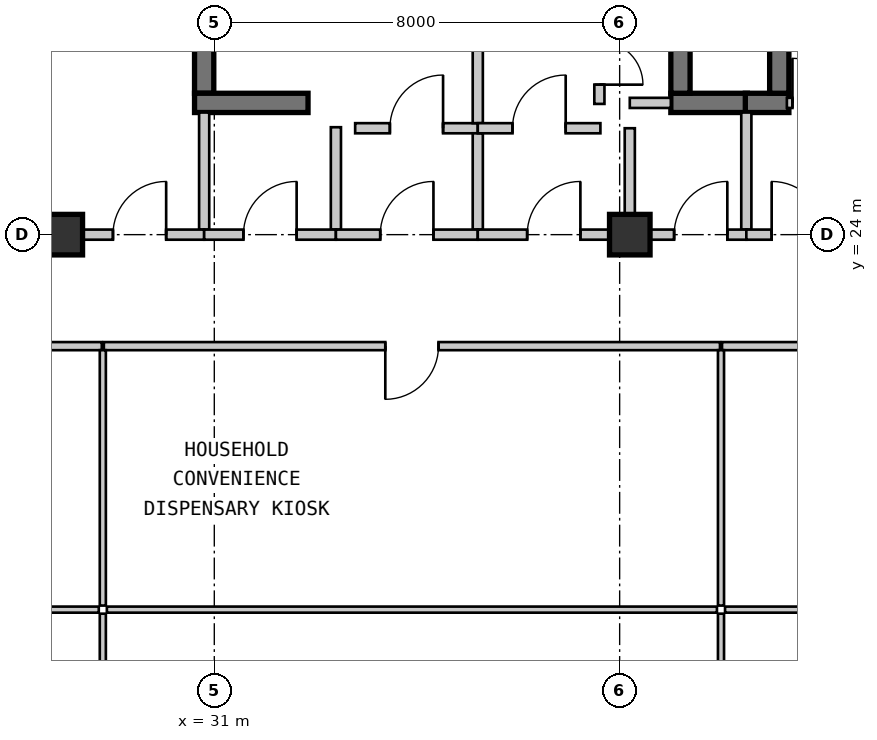
"""IFC4 building model, lengths in metres.
Left out: names, types, materials, properties, quantities, classifications, styles, units other than length and angle.
Written with IfcOpenShell. Run it as: python <this file> out.ifc"""

import sys

from ifc_helpers import new_model, si_unit, direction, frame, frame_2d, origin, origin_2d, place, context, subcontext, project, spatial, rectangle, extrude, source, transform, mapped, element, fill, save


model = new_model("IFC4")
c1 = context("Model", 3, precision=1e-05, world=origin(), true_north=direction((0.0, 1.0)))
c2 = subcontext(c1, "Body", "Model", "MODEL_VIEW")
j1 = project(units=[si_unit("LENGTHUNIT", "METRE"), si_unit("PLANEANGLEUNIT", "RADIAN")], contexts=[c1])
p1 = place(None, origin())
s1 = spatial("IfcSite", under=j1, at=p1, CompositionType="ELEMENT")
p2 = place(p1, origin())
s2 = spatial("IfcBuilding", under=s1, at=p2, CompositionType="ELEMENT")
p3 = place(p2, frame((0.0, 0.0, 45.15)))
s3 = spatial("IfcBuildingStorey", under=s2, at=p3, CompositionType="ELEMENT", Elevation=45.15)
m1 = source(origin(), c2, "Body", "SweptSolid", [
    extrude(rectangle(XDim=0.8, YDim=0.8, at=origin_2d()), origin(), (0.0, 0.0, 1.0), 3.15),
])
for number, where, z_axis, x_axis in (
    (1, (28.0, 24.0, 0.0), (0.0, 0.0, 1.0), (1.0, 0.0, 0.0)),
    (2, (39.2, 24.0, 0.0), (0.0, 0.0, 1.0), (1.0, 0.0, 0.0)),
):
    element("IfcColumn", number, at=place(p3, frame(where, z_axis=z_axis, x_axis=x_axis)), inside=s3, PredefinedType="COLUMN", context=c2, shape_type="MappedRepresentation", body=[
        mapped(m1, transform((0.0, 0.0, 0.0), scale=1.0)),
    ])
m2 = source(origin(), c2, "Body", "SweptSolid", [
    extrude(rectangle(XDim=1.22, YDim=0.38, at=frame_2d((0.61, 0.0))), origin(), (0.0, 0.0, 1.0), 2.93),
])
p4 = place(p3, frame((30.8, 28.01, 0.0), z_axis=(0.0, 0.0, 1.0), x_axis=(0.0, -1.0, 0.0)))
e3 = element("IfcWall", 3, at=p4, inside=s3, PredefinedType="SHEAR", context=c2, shape_type="MappedRepresentation", body=[
    mapped(m2, transform((0.0, 0.0, 0.0), scale=1.0)),
])
m3 = source(origin(), c2, "Body", "SweptSolid", [
    extrude(rectangle(XDim=2.24, YDim=0.38, at=frame_2d((1.12, 0.0))), origin(), (0.0, 0.0, 1.0), 2.93),
])
p5 = place(p3, frame((30.61, 26.6, 0.0), z_axis=(0.0, 0.0, 1.0), x_axis=(1.0, 0.0, 0.0)))
e4 = element("IfcWall", 4, at=p5, inside=s3, PredefinedType="SHEAR", context=c2, shape_type="MappedRepresentation", body=[
    mapped(m3, transform((0.0, 0.0, 0.0), scale=1.0)),
])
m4 = source(origin(), c2, "Body", "SweptSolid", [
    extrude(rectangle(XDim=1.51, YDim=0.38, at=frame_2d((0.755, 0.0))), origin(), (0.0, 0.0, 1.0), 2.93),
])
p6 = place(p3, frame((40.01, 26.6, 0.0), z_axis=(0.0, 0.0, 1.0), x_axis=(1.0, 0.0, 0.0)))
e5 = element("IfcWall", 5, at=p6, inside=s3, PredefinedType="SHEAR", context=c2, shape_type="MappedRepresentation", body=[
    mapped(m4, transform((0.0, 0.0, 0.0), scale=1.0)),
])
p7 = place(p3, frame((40.2, 28.01, 0.0), z_axis=(0.0, 0.0, 1.0), x_axis=(0.0, -1.0, 0.0)))
e6 = element("IfcWall", 6, at=p7, inside=s3, PredefinedType="SHEAR", context=c2, shape_type="MappedRepresentation", body=[
    mapped(m2, transform((0.0, 0.0, 0.0), scale=1.0)),
])
m5 = source(origin(), c2, "Body", "SweptSolid", [
    extrude(rectangle(XDim=0.86, YDim=0.38, at=frame_2d((0.43, 0.0))), origin(), (0.0, 0.0, 1.0), 2.93),
])
p8 = place(p3, frame((41.48, 26.6, 0.0), z_axis=(0.0, 0.0, 1.0), x_axis=(1.0, 0.0, 0.0)))
e7 = element("IfcWall", 7, at=p8, inside=s3, PredefinedType="SHEAR", context=c2, shape_type="MappedRepresentation", body=[
    mapped(m5, transform((0.0, 0.0, 0.0), scale=1.0)),
])
p9 = place(p3, frame((42.15, 26.79, 0.0), z_axis=(0.0, 0.0, 1.0), x_axis=(0.0, 1.0, 0.0)))
e8 = element("IfcWall", 8, at=p9, inside=s3, PredefinedType="SHEAR", context=c2, shape_type="MappedRepresentation", body=[
    mapped(m2, transform((0.0, 0.0, 0.0), scale=1.0)),
])
m6 = source(origin(), c2, "Body", "SweptSolid", [
    extrude(rectangle(XDim=2.31, YDim=0.2, at=frame_2d((1.155, 0.0))), origin(), (0.0, 0.0, 1.0), 2.93),
])
p10 = place(p3, frame((30.8, 26.41, 0.0), z_axis=(0.0, 0.0, 1.0), x_axis=(0.0, -1.0, 0.0)))
e9 = element("IfcWall", 9, at=p10, inside=s3, PredefinedType="SOLIDWALL", context=c2, shape_type="MappedRepresentation", body=[
    mapped(m6, transform((0.0, 0.0, 0.0), scale=1.0)),
])
m7 = source(origin(), c2, "Body", "SweptSolid", [
    extrude(rectangle(XDim=4.35, YDim=0.2, at=frame_2d((2.175, 0.0))), origin(), (0.0, 0.0, 1.0), 2.47),
])
p11 = place(p3, frame((30.8, 24.0, 0.0), z_axis=(0.0, 0.0, 1.0), x_axis=(-1.0, 0.0, 0.0)))
e10 = element("IfcWall", 10, at=p11, inside=s3, PredefinedType="SOLIDWALL", context=c2, shape_type="MappedRepresentation", body=[
    mapped(m7, transform((0.0, 0.0, 0.0), scale=1.0)),
])
m8 = source(origin(), c2, "Body", "SweptSolid", [
    extrude(rectangle(XDim=1.05, YDim=2.1, at=frame_2d((0.525, 1.05))), frame((0.0, 0.11, 0.0), z_axis=(0.0, -1.0, 0.0), x_axis=(1.0, 0.0, 0.0)), (0.0, 0.0, 1.0), 0.22),
])
p12 = place(p11, frame((0.75, 0.0, 0.0)))
e11 = element("IfcOpeningElement", 11, at=p12, cuts=e10, PredefinedType="OPENING", context=c2, shape_type="MappedRepresentation", body=[
    mapped(m8, transform((0.0, 0.0, 0.0), scale=1.0)),
])
m9 = source(origin(), c2, "Body", "SweptSolid", [
    extrude(rectangle(XDim=2.02, YDim=0.2, at=frame_2d((1.01, 0.0))), origin(), (0.0, 0.0, 1.0), 2.93),
])
p13 = place(p3, frame((33.4, 26.12, 0.0), z_axis=(0.0, 0.0, 1.0), x_axis=(0.0, -1.0, 0.0)))
e12 = element("IfcWall", 12, at=p13, inside=s3, PredefinedType="SOLIDWALL", context=c2, shape_type="MappedRepresentation", body=[
    mapped(m9, transform((0.0, 0.0, 0.0), scale=1.0)),
])
m10 = source(origin(), c2, "Body", "SweptSolid", [
    extrude(rectangle(XDim=2.6, YDim=0.2, at=frame_2d((1.3, 0.0))), origin(), (0.0, 0.0, 1.0), 2.47),
])
p14 = place(p3, frame((33.4, 24.0, 0.0), z_axis=(0.0, 0.0, 1.0), x_axis=(-1.0, 0.0, 0.0)))
e13 = element("IfcWall", 13, at=p14, inside=s3, PredefinedType="SOLIDWALL", context=c2, shape_type="MappedRepresentation", body=[
    mapped(m10, transform((0.0, 0.0, 0.0), scale=1.0)),
])
p15 = place(p14, frame((0.775, 0.0, 0.0)))
e14 = element("IfcOpeningElement", 14, at=p15, cuts=e13, PredefinedType="OPENING", context=c2, shape_type="MappedRepresentation", body=[
    mapped(m8, transform((0.0, 0.0, 0.0), scale=1.0)),
])
m11 = source(origin(), c2, "Body", "SweptSolid", [
    extrude(rectangle(XDim=2.42, YDim=0.2, at=frame_2d((1.21, 0.0))), origin(), (0.0, 0.0, 1.0), 2.93),
])
p16 = place(p3, frame((33.78, 26.1, 0.0), z_axis=(0.0, 0.0, 1.0), x_axis=(1.0, 0.0, 0.0)))
e15 = element("IfcWall", 15, at=p16, inside=s3, PredefinedType="SOLIDWALL", context=c2, shape_type="MappedRepresentation", body=[
    mapped(m11, transform((0.0, 0.0, 0.0), scale=1.0)),
])
p17 = place(p16, frame((0.685, 0.0, 0.0)))
e16 = element("IfcOpeningElement", 16, at=p17, cuts=e15, PredefinedType="OPENING", context=c2, shape_type="MappedRepresentation", body=[
    mapped(m8, transform((0.0, 0.0, 0.0), scale=1.0)),
])
m12 = source(origin(), c2, "Body", "SweptSolid", [
    extrude(rectangle(XDim=1.9, YDim=0.2, at=frame_2d((0.95, 0.0))), origin(), (0.0, 0.0, 1.0), 2.93),
])
p18 = place(p3, frame((36.2, 26.0, 0.0), z_axis=(0.0, 0.0, 1.0), x_axis=(0.0, -1.0, 0.0)))
e17 = element("IfcWall", 17, at=p18, inside=s3, PredefinedType="SOLIDWALL", context=c2, shape_type="MappedRepresentation", body=[
    mapped(m12, transform((0.0, 0.0, 0.0), scale=1.0)),
])
m13 = source(origin(), c2, "Body", "SweptSolid", [
    extrude(rectangle(XDim=2.8, YDim=0.2, at=frame_2d((1.4, 0.0))), origin(), (0.0, 0.0, 1.0), 2.47),
])
p19 = place(p3, frame((36.2, 24.0, 0.0), z_axis=(0.0, 0.0, 1.0), x_axis=(-1.0, 0.0, 0.0)))
e18 = element("IfcWall", 18, at=p19, inside=s3, PredefinedType="SOLIDWALL", context=c2, shape_type="MappedRepresentation", body=[
    mapped(m13, transform((0.0, 0.0, 0.0), scale=1.0)),
])
p20 = place(p19, frame((0.875, 0.0, 0.0)))
e19 = element("IfcOpeningElement", 19, at=p20, cuts=e18, PredefinedType="OPENING", context=c2, shape_type="MappedRepresentation", body=[
    mapped(m8, transform((0.0, 0.0, 0.0), scale=1.0)),
])
m14 = source(origin(), c2, "Body", "SweptSolid", [
    extrude(rectangle(XDim=1.9, YDim=0.2, at=frame_2d((0.95, 0.0))), origin(), (0.0, 0.0, 1.0), 2.93),
])
p21 = place(p3, frame((36.2, 28.1, 0.0), z_axis=(0.0, 0.0, 1.0), x_axis=(0.0, -1.0, 0.0)))
e20 = element("IfcWall", 20, at=p21, inside=s3, PredefinedType="SOLIDWALL", context=c2, shape_type="MappedRepresentation", body=[
    mapped(m14, transform((0.0, 0.0, 0.0), scale=1.0)),
])
m15 = source(origin(), c2, "Body", "SweptSolid", [
    extrude(rectangle(XDim=2.42, YDim=0.2, at=frame_2d((1.21, 0.0))), origin(), (0.0, 0.0, 1.0), 2.93),
])
p22 = place(p3, frame((36.2, 26.1, 0.0), z_axis=(0.0, 0.0, 1.0), x_axis=(1.0, 0.0, 0.0)))
e21 = element("IfcWall", 21, at=p22, inside=s3, PredefinedType="SOLIDWALL", context=c2, shape_type="MappedRepresentation", body=[
    mapped(m15, transform((0.0, 0.0, 0.0), scale=1.0)),
])
p23 = place(p22, frame((0.685, 0.0, 0.0)))
e22 = element("IfcOpeningElement", 22, at=p23, cuts=e21, PredefinedType="OPENING", context=c2, shape_type="MappedRepresentation", body=[
    mapped(m8, transform((0.0, 0.0, 0.0), scale=1.0)),
])
m16 = source(origin(), c2, "Body", "SweptSolid", [
    extrude(rectangle(XDim=2.0, YDim=0.2, at=frame_2d((1.0, 0.0))), origin(), (0.0, 0.0, 1.0), 2.47),
])
p24 = place(p3, frame((39.2, 26.1, 0.0), z_axis=(0.0, 0.0, 1.0), x_axis=(0.0, -1.0, 0.0)))
e23 = element("IfcWall", 23, at=p24, inside=s3, PredefinedType="SOLIDWALL", context=c2, shape_type="MappedRepresentation", body=[
    mapped(m16, transform((0.0, 0.0, 0.0), scale=1.0)),
])
m17 = source(origin(), c2, "Body", "SweptSolid", [
    extrude(rectangle(XDim=3.0, YDim=0.2, at=frame_2d((1.5, 0.0))), origin(), (0.0, 0.0, 1.0), 2.47),
])
p25 = place(p3, frame((39.2, 24.0, 0.0), z_axis=(0.0, 0.0, 1.0), x_axis=(-1.0, 0.0, 0.0)))
e24 = element("IfcWall", 24, at=p25, inside=s3, PredefinedType="SOLIDWALL", context=c2, shape_type="MappedRepresentation", body=[
    mapped(m17, transform((0.0, 0.0, 0.0), scale=1.0)),
])
p26 = place(p25, frame((0.975, 0.0, 0.0)))
e25 = element("IfcOpeningElement", 25, at=p26, cuts=e24, PredefinedType="OPENING", context=c2, shape_type="MappedRepresentation", body=[
    mapped(m8, transform((0.0, 0.0, 0.0), scale=1.0)),
])
m18 = source(origin(), c2, "Body", "SweptSolid", [
    extrude(rectangle(XDim=1.43, YDim=0.2, at=frame_2d((0.715, 0.0))), origin(), (0.0, 0.0, 1.0), 2.93),
])
p27 = place(p3, frame((38.6, 28.01, 0.0), z_axis=(0.0, 0.0, 1.0), x_axis=(0.0, -1.0, 0.0)))
e26 = element("IfcWall", 26, at=p27, inside=s3, PredefinedType="SOLIDWALL", context=c2, shape_type="MappedRepresentation", body=[
    mapped(m18, transform((0.0, 0.0, 0.0), scale=1.0)),
])
m19 = source(origin(), c2, "Body", "SweptSolid", [
    extrude(rectangle(XDim=0.86, YDim=2.1, at=frame_2d((0.43, 1.05))), frame((0.0, 0.11, 0.0), z_axis=(0.0, -1.0, 0.0), x_axis=(1.0, 0.0, 0.0)), (0.0, 0.0, 1.0), 0.22),
])
p28 = place(p27, frame((0.19, 0.0, 0.0)))
e27 = element("IfcOpeningElement", 27, at=p28, cuts=e26, PredefinedType="OPENING", context=c2, shape_type="MappedRepresentation", body=[
    mapped(m19, transform((0.0, 0.0, 0.0), scale=1.0)),
])
m20 = source(origin(), c2, "Body", "SweptSolid", [
    extrude(rectangle(XDim=0.81, YDim=0.2, at=frame_2d((0.405, 0.0))), origin(), (0.0, 0.0, 1.0), 2.93),
])
p29 = place(p3, frame((39.2, 26.6, 0.0), z_axis=(0.0, 0.0, 1.0), x_axis=(1.0, 0.0, 0.0)))
e28 = element("IfcWall", 28, at=p29, inside=s3, PredefinedType="SOLIDWALL", context=c2, shape_type="MappedRepresentation", body=[
    mapped(m20, transform((0.0, 0.0, 0.0), scale=1.0)),
])
p30 = place(p3, frame((41.5, 26.41, 0.0), z_axis=(0.0, 0.0, 1.0), x_axis=(0.0, -1.0, 0.0)))
e29 = element("IfcWall", 29, at=p30, inside=s3, PredefinedType="SOLIDWALL", context=c2, shape_type="MappedRepresentation", body=[
    mapped(m6, transform((0.0, 0.0, 0.0), scale=1.0)),
])
m21 = source(origin(), c2, "Body", "SweptSolid", [
    extrude(rectangle(XDim=2.3, YDim=0.2, at=frame_2d((1.15, 0.0))), origin(), (0.0, 0.0, 1.0), 2.397),
])
p31 = place(p3, frame((41.5, 24.0, 0.0), z_axis=(0.0, 0.0, 1.0), x_axis=(-1.0, 0.0, 0.0)))
e30 = element("IfcWall", 30, at=p31, inside=s3, PredefinedType="SOLIDWALL", context=c2, shape_type="MappedRepresentation", body=[
    mapped(m21, transform((0.0, 0.0, 0.0), scale=1.0)),
])
p32 = place(p31, frame((0.375, 0.0, 0.0)))
e31 = element("IfcOpeningElement", 31, at=p32, cuts=e30, PredefinedType="OPENING", context=c2, shape_type="MappedRepresentation", body=[
    mapped(m8, transform((0.0, 0.0, 0.0), scale=1.0)),
])
m22 = source(origin(), c2, "Body", "SweptSolid", [
    extrude(rectangle(XDim=1.25, YDim=0.2, at=frame_2d((0.625, 0.0))), origin(), (0.0, 0.0, 1.0), 2.93),
])
p33 = place(p3, frame((42.3, 26.6, 0.0), z_axis=(0.0, 0.0, 1.0), x_axis=(1.0, 0.0, 0.0)))
e32 = element("IfcWall", 32, at=p33, inside=s3, PredefinedType="SOLIDWALL", context=c2, shape_type="MappedRepresentation", body=[
    mapped(m22, transform((0.0, 0.0, 0.0), scale=1.0)),
])
m23 = source(origin(), c2, "Body", "SweptSolid", [
    extrude(rectangle(XDim=0.88, YDim=2.1, at=frame_2d((0.44, 1.05))), frame((0.0, 0.11, 0.0), z_axis=(0.0, -1.0, 0.0), x_axis=(1.0, 0.0, 0.0)), (0.0, 0.0, 1.0), 0.22),
])
p34 = place(p33, frame((0.11, 0.0, 0.0)))
e33 = element("IfcOpeningElement", 33, at=p34, cuts=e32, PredefinedType="OPENING", context=c2, shape_type="MappedRepresentation", body=[
    mapped(m23, transform((0.0, 0.0, 0.0), scale=1.0)),
])
m24 = source(origin(), c2, "Body", "SweptSolid", [
    extrude(rectangle(XDim=2.05, YDim=0.2, at=frame_2d((1.025, 0.0))), origin(), (0.0, 0.0, 1.0), 2.397),
])
p35 = place(p3, frame((43.55, 24.0, 0.0), z_axis=(0.0, 0.0, 1.0), x_axis=(-1.0, 0.0, 0.0)))
e34 = element("IfcWall", 34, at=p35, inside=s3, PredefinedType="SOLIDWALL", context=c2, shape_type="MappedRepresentation", body=[
    mapped(m24, transform((0.0, 0.0, 0.0), scale=1.0)),
])
p36 = place(p35, frame((0.5, 0.0, 0.0)))
e35 = element("IfcOpeningElement", 35, at=p36, cuts=e34, PredefinedType="OPENING", context=c2, shape_type="MappedRepresentation", body=[
    mapped(m8, transform((0.0, 0.0, 0.0), scale=1.0)),
])
m25 = source(origin(), c2, "Body", "SweptSolid", [
    extrude(rectangle(XDim=11.959, YDim=0.16, at=frame_2d((5.98, 0.0))), origin(), (0.0, 0.0, 1.0), 2.93),
])
p37 = place(p3, frame((28.78, 21.8, 0.0), z_axis=(0.0, 0.0, 1.0), x_axis=(-1.0, 0.0, 0.0)))
e36 = element("IfcWall", 36, at=p37, inside=s3, PredefinedType="PARTITIONING", context=c2, shape_type="MappedRepresentation", body=[
    mapped(m25, transform((0.0, 0.0, 0.0), scale=1.0)),
])
m26 = source(origin(), c2, "Body", "SweptSolid", [
    extrude(rectangle(XDim=1.05, YDim=2.1, at=frame_2d((0.525, 1.05))), frame((0.0, 0.09, 0.0), z_axis=(0.0, -1.0, 0.0), x_axis=(1.0, 0.0, 0.0)), (0.0, 0.0, 1.0), 0.18),
])
p38 = place(p37, frame((5.455, 0.0, 0.0)))
e37 = element("IfcOpeningElement", 37, at=p38, cuts=e36, PredefinedType="OPENING", context=c2, shape_type="MappedRepresentation", body=[
    mapped(m26, transform((0.0, 0.0, 0.0), scale=1.0)),
])
m27 = source(origin(), c2, "Body", "SweptSolid", [
    extrude(rectangle(XDim=12.159, YDim=0.16, at=frame_2d((6.08, 0.0))), origin(), (0.0, 0.0, 1.0), 2.93),
])
p39 = place(p3, frame((40.98, 21.8, 0.0), z_axis=(0.0, 0.0, 1.0), x_axis=(-1.0, 0.0, 0.0)))
e38 = element("IfcWall", 38, at=p39, inside=s3, PredefinedType="PARTITIONING", context=c2, shape_type="MappedRepresentation", body=[
    mapped(m27, transform((0.0, 0.0, 0.0), scale=1.0)),
])
p40 = place(p39, frame((5.555, 0.0, 0.0)))
e39 = element("IfcOpeningElement", 39, at=p40, cuts=e38, PredefinedType="OPENING", context=c2, shape_type="MappedRepresentation", body=[
    mapped(m26, transform((0.0, 0.0, 0.0), scale=1.0)),
])
p41 = place(p3, frame((53.18, 21.8, 0.0), z_axis=(0.0, 0.0, 1.0), x_axis=(-1.0, 0.0, 0.0)))
e40 = element("IfcWall", 40, at=p41, inside=s3, PredefinedType="PARTITIONING", context=c2, shape_type="MappedRepresentation", body=[
    mapped(m27, transform((0.0, 0.0, 0.0), scale=1.0)),
])
p42 = place(p41, frame((5.555, 0.0, 0.0)))
e41 = element("IfcOpeningElement", 41, at=p42, cuts=e40, PredefinedType="OPENING", context=c2, shape_type="MappedRepresentation", body=[
    mapped(m26, transform((0.0, 0.0, 0.0), scale=1.0)),
])
m28 = source(origin(), c2, "Body", "SweptSolid", [
    extrude(rectangle(XDim=11.84, YDim=0.12, at=frame_2d((5.92, 0.0))), origin(), (0.0, 0.0, 1.0), 2.93),
])
p43 = place(p3, frame((16.88, 16.6, 0.0), z_axis=(0.0, 0.0, 1.0), x_axis=(1.0, 0.0, 0.0)))
e42 = element("IfcWall", 42, at=p43, inside=s3, PredefinedType="PARTITIONING", context=c2, shape_type="MappedRepresentation", body=[
    mapped(m28, transform((0.0, 0.0, 0.0), scale=1.0)),
])
m29 = source(origin(), c2, "Body", "SweptSolid", [
    extrude(rectangle(XDim=5.04, YDim=0.12, at=frame_2d((2.52, 0.0))), origin(), (0.0, 0.0, 1.0), 2.93),
])
for number, where, z_axis, x_axis in (
    (43, (28.8, 16.52, 0.0), (0.0, 0.0, 1.0), (0.0, -1.0, 0.0)),
    (44, (28.8, 21.72, 0.0), (0.0, 0.0, 1.0), (0.0, -1.0, 0.0)),
):
    element("IfcWall", number, at=place(p3, frame(where, z_axis=z_axis, x_axis=x_axis)), inside=s3, PredefinedType="PARTITIONING", context=c2, shape_type="MappedRepresentation", body=[
        mapped(m29, transform((0.0, 0.0, 0.0), scale=1.0)),
    ])
m30 = source(origin(), c2, "Body", "SweptSolid", [
    extrude(rectangle(XDim=12.04, YDim=0.12, at=frame_2d((6.02, 0.0))), origin(), (0.0, 0.0, 1.0), 2.93),
])
p44 = place(p3, frame((28.88, 16.6, 0.0), z_axis=(0.0, 0.0, 1.0), x_axis=(1.0, 0.0, 0.0)))
e45 = element("IfcWall", 45, at=p44, inside=s3, PredefinedType="PARTITIONING", context=c2, shape_type="MappedRepresentation", body=[
    mapped(m30, transform((0.0, 0.0, 0.0), scale=1.0)),
])
m31 = source(origin(), c2, "Body", "SweptSolid", [
    extrude(rectangle(XDim=1.104, YDim=0.12, at=frame_2d((0.552, 0.0))), origin(), (0.0, 0.0, 1.0), 2.93),
])
p45 = place(p3, frame((41.0, 16.52, 0.0), z_axis=(0.0, 0.0, 1.0), x_axis=(0.0, -1.0, 0.0)))
e46 = element("IfcWall", 46, at=p45, inside=s3, PredefinedType="PARTITIONING", context=c2, shape_type="MappedRepresentation", body=[
    mapped(m31, transform((0.0, 0.0, 0.0), scale=1.0)),
])
p46 = place(p3, frame((41.0, 21.72, 0.0), z_axis=(0.0, 0.0, 1.0), x_axis=(0.0, -1.0, 0.0)))
e47 = element("IfcWall", 47, at=p46, inside=s3, PredefinedType="PARTITIONING", context=c2, shape_type="MappedRepresentation", body=[
    mapped(m29, transform((0.0, 0.0, 0.0), scale=1.0)),
])
p47 = place(p3, frame((41.08, 16.6, 0.0), z_axis=(0.0, 0.0, 1.0), x_axis=(1.0, 0.0, 0.0)))
e48 = element("IfcWall", 48, at=p47, inside=s3, PredefinedType="PARTITIONING", context=c2, shape_type="MappedRepresentation", body=[
    mapped(m30, transform((0.0, 0.0, 0.0), scale=1.0)),
])
m32 = source(origin(), c2, "Body", "SweptSolid", [
    extrude(rectangle(XDim=1.05, YDim=2.1, at=frame_2d((0.525, 1.05))), frame((0.0, 0.025, 0.0), z_axis=(0.0, -1.0, 0.0), x_axis=(1.0, 0.0, 0.0)), (0.0, 0.0, 1.0), 0.05),
])
p48 = place(p12, frame((1.05, 0.0, 0.0), z_axis=(0.0, 0.0, 1.0), x_axis=(-1.0, 0.0, 0.0)))
e49 = element("IfcDoor", 49, at=p48, inside=s3, OperationType="SINGLE_SWING_RIGHT", PredefinedType="DOOR", context=c2, shape_type="MappedRepresentation", body=[
    mapped(m32, transform((0.0, 0.0, 0.0), scale=1.0)),
])
fill(e11, e49)
p49 = place(p15, frame((1.05, 0.0, 0.0), z_axis=(0.0, 0.0, 1.0), x_axis=(-1.0, 0.0, 0.0)))
e50 = element("IfcDoor", 50, at=p49, inside=s3, OperationType="SINGLE_SWING_RIGHT", PredefinedType="DOOR", context=c2, shape_type="MappedRepresentation", body=[
    mapped(m32, transform((0.0, 0.0, 0.0), scale=1.0)),
])
fill(e14, e50)
p50 = place(p17, origin())
e51 = element("IfcDoor", 51, at=p50, inside=s3, OperationType="SINGLE_SWING_RIGHT", PredefinedType="DOOR", context=c2, shape_type="MappedRepresentation", body=[
    mapped(m32, transform((0.0, 0.0, 0.0), scale=1.0)),
])
fill(e16, e51)
p51 = place(p20, frame((1.05, 0.0, 0.0), z_axis=(0.0, 0.0, 1.0), x_axis=(-1.0, 0.0, 0.0)))
e52 = element("IfcDoor", 52, at=p51, inside=s3, OperationType="SINGLE_SWING_RIGHT", PredefinedType="DOOR", context=c2, shape_type="MappedRepresentation", body=[
    mapped(m32, transform((0.0, 0.0, 0.0), scale=1.0)),
])
fill(e19, e52)
p52 = place(p23, origin())
e53 = element("IfcDoor", 53, at=p52, inside=s3, OperationType="SINGLE_SWING_RIGHT", PredefinedType="DOOR", context=c2, shape_type="MappedRepresentation", body=[
    mapped(m32, transform((0.0, 0.0, 0.0), scale=1.0)),
])
fill(e22, e53)
p53 = place(p26, frame((1.05, 0.0, 0.0), z_axis=(0.0, 0.0, 1.0), x_axis=(-1.0, 0.0, 0.0)))
e54 = element("IfcDoor", 54, at=p53, inside=s3, OperationType="SINGLE_SWING_RIGHT", PredefinedType="DOOR", context=c2, shape_type="MappedRepresentation", body=[
    mapped(m32, transform((0.0, 0.0, 0.0), scale=1.0)),
])
fill(e25, e54)
p54 = place(p32, frame((1.05, 0.0, 0.0), z_axis=(0.0, 0.0, 1.0), x_axis=(-1.0, 0.0, 0.0)))
e55 = element("IfcDoor", 55, at=p54, inside=s3, OperationType="SINGLE_SWING_RIGHT", PredefinedType="DOOR", context=c2, shape_type="MappedRepresentation", body=[
    mapped(m32, transform((0.0, 0.0, 0.0), scale=1.0)),
])
fill(e31, e55)
m33 = source(origin(), c2, "Body", "SweptSolid", [
    extrude(rectangle(XDim=0.88, YDim=2.1, at=frame_2d((0.44, 1.05))), frame((0.0, 0.025, 0.0), z_axis=(0.0, -1.0, 0.0), x_axis=(1.0, 0.0, 0.0)), (0.0, 0.0, 1.0), 0.05),
])
p55 = place(p34, origin())
e56 = element("IfcDoor", 56, at=p55, inside=s3, OperationType="SINGLE_SWING_LEFT", PredefinedType="DOOR", context=c2, shape_type="MappedRepresentation", body=[
    mapped(m33, transform((0.0, 0.0, 0.0), scale=1.0)),
])
fill(e33, e56)
p56 = place(p36, frame((1.05, 0.0, 0.0), z_axis=(0.0, 0.0, 1.0), x_axis=(-1.0, 0.0, 0.0)))
e57 = element("IfcDoor", 57, at=p56, inside=s3, OperationType="SINGLE_SWING_LEFT", PredefinedType="DOOR", context=c2, shape_type="MappedRepresentation", body=[
    mapped(m32, transform((0.0, 0.0, 0.0), scale=1.0)),
])
fill(e35, e57)
p57 = place(p40, origin())
e58 = element("IfcDoor", 58, at=p57, inside=s3, OperationType="SINGLE_SWING_RIGHT", PredefinedType="DOOR", context=c2, shape_type="MappedRepresentation", body=[
    mapped(m32, transform((0.0, 0.0, 0.0), scale=1.0)),
])
fill(e39, e58)
m34 = source(origin(), c2, "Body", "SweptSolid", [
    extrude(rectangle(XDim=0.86, YDim=2.1, at=frame_2d((0.43, 1.05))), frame((0.0, 0.025, 0.0), z_axis=(0.0, -1.0, 0.0), x_axis=(1.0, 0.0, 0.0)), (0.0, 0.0, 1.0), 0.05),
])
p58 = place(p28, origin())
e59 = element("IfcDoor", 59, at=p58, inside=s3, OperationType="SINGLE_SWING_RIGHT", PredefinedType="DOOR", context=c2, shape_type="MappedRepresentation", body=[
    mapped(m34, transform((0.0, 0.0, 0.0), scale=1.0)),
])
fill(e27, e59)
save(model, sys.argv[1])
